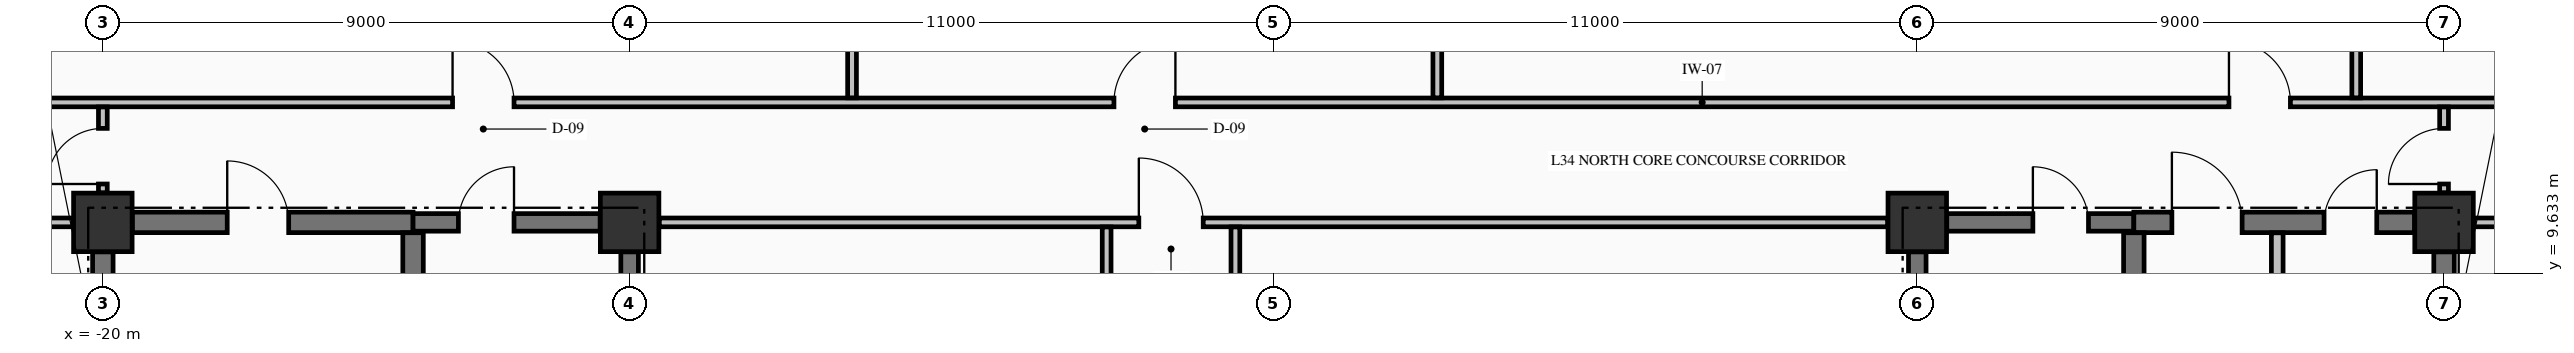
"""IFC4 building model, lengths in metres.
Left out: names, types, materials, properties, quantities, classifications, styles, units other than length and angle.
Written with IfcOpenShell. Run it as: python <this file> out.ifc"""

import sys

from ifc_helpers import new_model, si_unit, direction, frame, frame_2d, origin, origin_2d, place, context, subcontext, project, spatial, rectangle, extrude, element, fill, save


model = new_model("IFC4")
c1 = context("Model", 3, precision=1e-05, world=origin(), true_north=direction((0.0, 1.0)))
c2 = subcontext(c1, "Body", "Model", "MODEL_VIEW")
j1 = project(units=[si_unit("LENGTHUNIT", "METRE"), si_unit("PLANEANGLEUNIT", "RADIAN")], contexts=[c1])
p1 = place(None, origin())
s1 = spatial("IfcSite", under=j1, at=p1, CompositionType="ELEMENT")
p2 = place(p1, origin())
s2 = spatial("IfcBuilding", under=s1, at=p2, CompositionType="ELEMENT")
p3 = place(p2, frame((0.0, 0.0, 135.63)))
s3 = spatial("IfcBuildingStorey", under=s2, at=p3, CompositionType="ELEMENT", Elevation=135.63)
for number, where, z_axis, x_axis in (
    (1, (-20.0, 10.5, -0.25), (0.0, 0.0, 1.0), (1.0, 0.0, 0.0)),
    (2, (-11.0, 10.5, -0.25), (0.0, 0.0, 1.0), (1.0, 0.0, 0.0)),
    (3, (11.0, 10.5, -0.25), (0.0, 0.0, 1.0), (1.0, 0.0, 0.0)),
    (4, (20.0, 10.5, -0.25), (0.0, 0.0, 1.0), (1.0, 0.0, 0.0)),
):
    element("IfcColumn", number, at=place(p3, frame(where, z_axis=z_axis, x_axis=x_axis)), inside=s3, PredefinedType="COLUMN", context=c2, shape_type="SweptSolid", body=[
        extrude(rectangle(XDim=1.0, YDim=1.0, at=origin_2d()), origin(), (0.0, 0.0, 1.0), 3.57),
    ])
p4 = place(p3, frame((-19.496, 10.5, 0.0), z_axis=(0.0, 0.0, 1.0), x_axis=(1.0, 0.0, 0.0)))
e5 = element("IfcWall", 5, at=p4, inside=s3, PredefinedType="SHEAR", context=c2, shape_type="SweptSolid", body=[
    extrude(rectangle(XDim=4.796, YDim=0.35, at=frame_2d((2.398, 0.0))), origin(), (0.0, 0.0, 1.0), 3.32),
])
p5 = place(p4, frame((1.621, 0.0, 0.0)))
e6 = element("IfcOpeningElement", 6, at=p5, cuts=e5, PredefinedType="OPENING", context=c2, shape_type="SweptSolid", body=[
    extrude(rectangle(XDim=1.05, YDim=2.15, at=frame_2d((0.525, 1.075))), frame((0.0, 0.185, 0.0), z_axis=(0.0, -1.0, 0.0), x_axis=(1.0, 0.0, 0.0)), (0.0, 0.0, 1.0), 0.37),
])
p6 = place(p3, frame((-14.7, 10.5, 0.0), z_axis=(0.0, 0.0, 1.0), x_axis=(1.0, 0.0, 0.0)))
e7 = element("IfcWall", 7, at=p6, inside=s3, PredefinedType="SHEAR", context=c2, shape_type="SweptSolid", body=[
    extrude(rectangle(XDim=3.196, YDim=0.3, at=frame_2d((1.598, 0.0))), origin(), (0.0, 0.0, 1.0), 3.32),
])
p7 = place(p6, frame((0.775, 0.0, 0.0)))
e8 = element("IfcOpeningElement", 8, at=p7, cuts=e7, PredefinedType="OPENING", context=c2, shape_type="SweptSolid", body=[
    extrude(rectangle(XDim=0.95, YDim=2.15, at=frame_2d((0.475, 1.075))), frame((0.0, 0.16, 0.0), z_axis=(0.0, -1.0, 0.0), x_axis=(1.0, 0.0, 0.0)), (0.0, 0.0, 1.0), 0.32),
])
p8 = place(p3, frame((11.504, 10.5, 0.0), z_axis=(0.0, 0.0, 1.0), x_axis=(1.0, 0.0, 0.0)))
e9 = element("IfcWall", 9, at=p8, inside=s3, PredefinedType="SHEAR", context=c2, shape_type="SweptSolid", body=[
    extrude(rectangle(XDim=3.196, YDim=0.3, at=frame_2d((1.598, 0.0))), origin(), (0.0, 0.0, 1.0), 3.32),
])
p9 = place(p8, frame((1.471, 0.0, 0.0)))
e10 = element("IfcOpeningElement", 10, at=p9, cuts=e9, PredefinedType="OPENING", context=c2, shape_type="SweptSolid", body=[
    extrude(rectangle(XDim=0.95, YDim=2.15, at=frame_2d((0.475, 1.075))), frame((0.0, 0.16, 0.0), z_axis=(0.0, -1.0, 0.0), x_axis=(1.0, 0.0, 0.0)), (0.0, 0.0, 1.0), 0.32),
])
p10 = place(p3, frame((14.7, 10.5, 0.0), z_axis=(0.0, 0.0, 1.0), x_axis=(1.0, 0.0, 0.0)))
e11 = element("IfcWall", 11, at=p10, inside=s3, PredefinedType="SHEAR", context=c2, shape_type="SweptSolid", body=[
    extrude(rectangle(XDim=4.796, YDim=0.35, at=frame_2d((2.398, 0.0))), origin(), (0.0, 0.0, 1.0), 3.32),
])
p11 = place(p10, frame((0.65, 0.0, 0.0)))
e12 = element("IfcOpeningElement", 12, at=p11, cuts=e11, PredefinedType="OPENING", context=c2, shape_type="SweptSolid", body=[
    extrude(rectangle(XDim=1.2, YDim=2.15, at=frame_2d((0.6, 1.075))), frame((0.0, 0.185, 0.0), z_axis=(0.0, -1.0, 0.0), x_axis=(1.0, 0.0, 0.0)), (0.0, 0.0, 1.0), 0.37),
])
p12 = place(p10, frame((3.25, 0.0, 0.0)))
e13 = element("IfcOpeningElement", 13, at=p12, cuts=e11, PredefinedType="OPENING", context=c2, shape_type="SweptSolid", body=[
    extrude(rectangle(XDim=0.9, YDim=2.15, at=frame_2d((0.45, 1.075))), frame((0.0, 0.185, 0.0), z_axis=(0.0, -1.0, 0.0), x_axis=(1.0, 0.0, 0.0)), (0.0, 0.0, 1.0), 0.37),
])
p13 = place(p3, frame((-27.835, 10.5, 0.0), z_axis=(0.0, 0.0, 1.0), x_axis=(1.0, 0.0, 0.0)))
e14 = element("IfcWall", 14, at=p13, inside=s3, PredefinedType="PARTITIONING", context=c2, shape_type="SweptSolid", body=[
    extrude(rectangle(XDim=7.329, YDim=0.15, at=frame_2d((3.665, 0.0))), origin(), (0.0, 0.0, 1.0), 3.32),
])
p14 = place(p13, frame((3.36, 0.0, 0.0)))
e15 = element("IfcOpeningElement", 15, at=p14, cuts=e14, PredefinedType="OPENING", context=c2, shape_type="SweptSolid", body=[
    extrude(rectangle(XDim=0.95, YDim=2.15, at=frame_2d((0.475, 1.075))), frame((0.0, 0.085, 0.0), z_axis=(0.0, -1.0, 0.0), x_axis=(1.0, 0.0, 0.0)), (0.0, 0.0, 1.0), 0.17),
])
p15 = place(p3, frame((-10.494, 10.5, 0.0), z_axis=(0.0, 0.0, 1.0), x_axis=(1.0, 0.0, 0.0)))
e16 = element("IfcWall", 16, at=p15, inside=s3, PredefinedType="PARTITIONING", context=c2, shape_type="SweptSolid", body=[
    extrude(rectangle(XDim=20.988, YDim=0.15, at=frame_2d((10.494, 0.0))), origin(), (0.0, 0.0, 1.0), 3.32),
])
p16 = place(p15, frame((8.194, 0.0, 0.0)))
e17 = element("IfcOpeningElement", 17, at=p16, cuts=e16, PredefinedType="OPENING", context=c2, shape_type="SweptSolid", body=[
    extrude(rectangle(XDim=1.1, YDim=2.15, at=frame_2d((0.55, 1.075))), frame((0.0, 0.085, 0.0), z_axis=(0.0, -1.0, 0.0), x_axis=(1.0, 0.0, 0.0)), (0.0, 0.0, 1.0), 0.17),
])
p17 = place(p3, frame((20.506, 10.5, 0.0), z_axis=(0.0, 0.0, 1.0), x_axis=(1.0, 0.0, 0.0)))
e18 = element("IfcWall", 18, at=p17, inside=s3, PredefinedType="PARTITIONING", context=c2, shape_type="SweptSolid", body=[
    extrude(rectangle(XDim=2.329, YDim=0.15, at=frame_2d((1.165, 0.0))), origin(), (0.0, 0.0, 1.0), 3.32),
])
p18 = place(p17, frame((0.494, 0.0, 0.0)))
e19 = element("IfcOpeningElement", 19, at=p18, cuts=e18, PredefinedType="OPENING", context=c2, shape_type="SweptSolid", body=[
    extrude(rectangle(XDim=1.0, YDim=2.15, at=frame_2d((0.5, 1.075))), frame((0.0, 0.085, 0.0), z_axis=(0.0, -1.0, 0.0), x_axis=(1.0, 0.0, 0.0)), (0.0, 0.0, 1.0), 0.17),
])
p19 = place(p3, frame((-27.835, 12.55, 0.0), z_axis=(0.0, 0.0, 1.0), x_axis=(1.0, 0.0, 0.0)))
e20 = element("IfcWall", 20, at=p19, inside=s3, PredefinedType="PARTITIONING", context=c2, shape_type="SweptSolid", body=[
    extrude(rectangle(XDim=50.67, YDim=0.15, at=frame_2d((25.335, 0.0))), origin(), (0.0, 0.0, 1.0), 3.32),
])
p20 = place(p19, frame((13.81, 0.0, 0.0)))
e21 = element("IfcOpeningElement", 21, at=p20, cuts=e20, PredefinedType="OPENING", context=c2, shape_type="SweptSolid", body=[
    extrude(rectangle(XDim=1.05, YDim=2.15, at=frame_2d((0.525, 1.075))), frame((0.0, 0.085, 0.0), z_axis=(0.0, -1.0, 0.0), x_axis=(1.0, 0.0, 0.0)), (0.0, 0.0, 1.0), 0.17),
])
p21 = place(p19, frame((25.11, 0.0, 0.0)))
e22 = element("IfcOpeningElement", 22, at=p21, cuts=e20, PredefinedType="OPENING", context=c2, shape_type="SweptSolid", body=[
    extrude(rectangle(XDim=1.05, YDim=2.15, at=frame_2d((0.525, 1.075))), frame((0.0, 0.085, 0.0), z_axis=(0.0, -1.0, 0.0), x_axis=(1.0, 0.0, 0.0)), (0.0, 0.0, 1.0), 0.17),
])
p22 = place(p19, frame((44.16, 0.0, 0.0)))
e23 = element("IfcOpeningElement", 23, at=p22, cuts=e20, PredefinedType="OPENING", context=c2, shape_type="SweptSolid", body=[
    extrude(rectangle(XDim=1.05, YDim=2.15, at=frame_2d((0.525, 1.075))), frame((0.0, 0.085, 0.0), z_axis=(0.0, -1.0, 0.0), x_axis=(1.0, 0.0, 0.0)), (0.0, 0.0, 1.0), 0.17),
])
p23 = place(p3, frame((-20.0, 0.504, 0.0), z_axis=(0.0, 0.0, 1.0), x_axis=(0.0, 1.0, 0.0)))
e24 = element("IfcWall", 24, at=p23, inside=s3, PredefinedType="SHEAR", context=c2, shape_type="SweptSolid", body=[
    extrude(rectangle(XDim=9.492, YDim=0.35, at=frame_2d((4.746, 0.0))), origin(), (0.0, 0.0, 1.0), 3.32),
])
p24 = place(p3, frame((-14.7, 5.852, 0.0), z_axis=(0.0, 0.0, 1.0), x_axis=(0.0, 1.0, 0.0)))
e25 = element("IfcWall", 25, at=p24, inside=s3, PredefinedType="SHEAR", context=c2, shape_type="SweptSolid", body=[
    extrude(rectangle(XDim=4.471, YDim=0.35, at=frame_2d((2.235, 0.0))), origin(), (0.0, 0.0, 1.0), 3.32),
])
for number, where, z_axis, x_axis in (
    (26, (-11.0, 5.852, 0.0), (0.0, 0.0, 1.0), (0.0, 1.0, 0.0)),
    (27, (11.0, 5.852, 0.0), (0.0, 0.0, 1.0), (0.0, 1.0, 0.0)),
):
    element("IfcWall", number, at=place(p3, frame(where, z_axis=z_axis, x_axis=x_axis)), inside=s3, PredefinedType="SHEAR", context=c2, shape_type="SweptSolid", body=[
        extrude(rectangle(XDim=4.144, YDim=0.3, at=frame_2d((2.072, 0.0))), origin(), (0.0, 0.0, 1.0), 3.32),
    ])
p25 = place(p3, frame((14.7, 5.852, 0.0), z_axis=(0.0, 0.0, 1.0), x_axis=(0.0, 1.0, 0.0)))
e28 = element("IfcWall", 28, at=p25, inside=s3, PredefinedType="SHEAR", context=c2, shape_type="SweptSolid", body=[
    extrude(rectangle(XDim=4.471, YDim=0.35, at=frame_2d((2.235, 0.0))), origin(), (0.0, 0.0, 1.0), 3.32),
])
p26 = place(p3, frame((20.0, 5.377, 0.0), z_axis=(0.0, 0.0, 1.0), x_axis=(0.0, 1.0, 0.0)))
e29 = element("IfcWall", 29, at=p26, inside=s3, PredefinedType="SHEAR", context=c2, shape_type="SweptSolid", body=[
    extrude(rectangle(XDim=4.619, YDim=0.35, at=frame_2d((2.31, 0.0))), origin(), (0.0, 0.0, 1.0), 3.32),
])
p27 = place(p3, frame((-20.0, 11.006, 0.0), z_axis=(0.0, 0.0, 1.0), x_axis=(0.0, 1.0, 0.0)))
e30 = element("IfcWall", 30, at=p27, inside=s3, PredefinedType="PARTITIONING", context=c2, shape_type="SweptSolid", body=[
    extrude(rectangle(XDim=1.466, YDim=0.15, at=frame_2d((0.733, 0.0))), origin(), (0.0, 0.0, 1.0), 2.81),
])
p28 = place(p27, frame((0.15, 0.0, 0.0)))
e31 = element("IfcOpeningElement", 31, at=p28, cuts=e30, PredefinedType="OPENING", context=c2, shape_type="SweptSolid", body=[
    extrude(rectangle(XDim=0.95, YDim=2.15, at=frame_2d((0.475, 1.075))), frame((0.0, 0.085, 0.0), z_axis=(0.0, -1.0, 0.0), x_axis=(1.0, 0.0, 0.0)), (0.0, 0.0, 1.0), 0.17),
])
p29 = place(p3, frame((-7.2, 12.628, 0.0), z_axis=(0.0, 0.0, 1.0), x_axis=(0.0, 1.0, 0.0)))
e32 = element("IfcWall", 32, at=p29, inside=s3, PredefinedType="PARTITIONING", context=c2, shape_type="SweptSolid", body=[
    extrude(rectangle(XDim=12.707, YDim=0.15, at=frame_2d((6.354, 0.0))), origin(), (0.0, 0.0, 1.0), 3.32),
])
for number, where, z_axis, x_axis in (
    (33, (-2.85, 2.978, 0.0), (0.0, 0.0, 1.0), (0.0, 1.0, 0.0)),
    (34, (-0.65, 2.978, 0.0), (0.0, 0.0, 1.0), (0.0, 1.0, 0.0)),
):
    element("IfcWall", number, at=place(p3, frame(where, z_axis=z_axis, x_axis=x_axis)), inside=s3, PredefinedType="PARTITIONING", context=c2, shape_type="SweptSolid", body=[
        extrude(rectangle(XDim=7.444, YDim=0.15, at=frame_2d((3.722, 0.0))), origin(), (0.0, 0.0, 1.0), 3.32),
    ])
p30 = place(p3, frame((2.8, 12.628, 0.0), z_axis=(0.0, 0.0, 1.0), x_axis=(0.0, 1.0, 0.0)))
e35 = element("IfcWall", 35, at=p30, inside=s3, PredefinedType="PARTITIONING", context=c2, shape_type="SweptSolid", body=[
    extrude(rectangle(XDim=12.707, YDim=0.15, at=frame_2d((6.354, 0.0))), origin(), (0.0, 0.0, 1.0), 3.32),
])
p31 = place(p3, frame((17.15, 5.378, 0.0), z_axis=(0.0, 0.0, 1.0), x_axis=(0.0, 1.0, 0.0)))
e36 = element("IfcWall", 36, at=p31, inside=s3, PredefinedType="PARTITIONING", context=c2, shape_type="SweptSolid", body=[
    extrude(rectangle(XDim=4.944, YDim=0.2, at=frame_2d((2.472, 0.0))), origin(), (0.0, 0.0, 1.0), 3.32),
])
p32 = place(p3, frame((18.5, 12.628, 0.0), z_axis=(0.0, 0.0, 1.0), x_axis=(0.0, 1.0, 0.0)))
e37 = element("IfcWall", 37, at=p32, inside=s3, PredefinedType="PARTITIONING", context=c2, shape_type="SweptSolid", body=[
    extrude(rectangle(XDim=7.766, YDim=0.15, at=frame_2d((3.883, 0.0))), origin(), (0.0, 0.0, 1.0), 3.32),
])
p33 = place(p3, frame((20.0, 11.006, 0.0), z_axis=(0.0, 0.0, 1.0), x_axis=(0.0, 1.0, 0.0)))
e38 = element("IfcWall", 38, at=p33, inside=s3, PredefinedType="PARTITIONING", context=c2, shape_type="SweptSolid", body=[
    extrude(rectangle(XDim=1.466, YDim=0.15, at=frame_2d((0.733, 0.0))), origin(), (0.0, 0.0, 1.0), 2.81),
])
p34 = place(p33, frame((0.15, 0.0, 0.0)))
e39 = element("IfcOpeningElement", 39, at=p34, cuts=e38, PredefinedType="OPENING", context=c2, shape_type="SweptSolid", body=[
    extrude(rectangle(XDim=0.95, YDim=2.15, at=frame_2d((0.475, 1.075))), frame((0.0, 0.085, 0.0), z_axis=(0.0, -1.0, 0.0), x_axis=(1.0, 0.0, 0.0)), (0.0, 0.0, 1.0), 0.17),
])
p35 = place(p7, origin())
e40 = element("IfcDoor", 40, at=p35, inside=s3, OperationType="SINGLE_SWING_RIGHT", PredefinedType="DOOR", context=c2, shape_type="SweptSolid", body=[
    extrude(rectangle(XDim=0.95, YDim=2.15, at=frame_2d((0.475, 1.075))), frame((0.0, 0.025, 0.0), z_axis=(0.0, -1.0, 0.0), x_axis=(1.0, 0.0, 0.0)), (0.0, 0.0, 1.0), 0.05),
])
fill(e8, e40)
p36 = place(p9, origin())
e41 = element("IfcDoor", 41, at=p36, inside=s3, OperationType="SINGLE_SWING_LEFT", PredefinedType="DOOR", context=c2, shape_type="SweptSolid", body=[
    extrude(rectangle(XDim=0.95, YDim=2.15, at=frame_2d((0.475, 1.075))), frame((0.0, 0.025, 0.0), z_axis=(0.0, -1.0, 0.0), x_axis=(1.0, 0.0, 0.0)), (0.0, 0.0, 1.0), 0.05),
])
fill(e10, e41)
p37 = place(p5, origin())
e42 = element("IfcDoor", 42, at=p37, inside=s3, OperationType="SINGLE_SWING_LEFT", PredefinedType="DOOR", context=c2, shape_type="SweptSolid", body=[
    extrude(rectangle(XDim=1.05, YDim=2.15, at=frame_2d((0.525, 1.075))), frame((0.0, 0.025, 0.0), z_axis=(0.0, -1.0, 0.0), x_axis=(1.0, 0.0, 0.0)), (0.0, 0.0, 1.0), 0.05),
])
fill(e6, e42)
p38 = place(p11, origin())
e43 = element("IfcDoor", 43, at=p38, inside=s3, OperationType="SINGLE_SWING_LEFT", PredefinedType="DOOR", context=c2, shape_type="SweptSolid", body=[
    extrude(rectangle(XDim=1.2, YDim=2.15, at=frame_2d((0.6, 1.075))), frame((0.0, 0.025, 0.0), z_axis=(0.0, -1.0, 0.0), x_axis=(1.0, 0.0, 0.0)), (0.0, 0.0, 1.0), 0.05),
])
fill(e12, e43)
p39 = place(p12, origin())
e44 = element("IfcDoor", 44, at=p39, inside=s3, OperationType="SINGLE_SWING_RIGHT", PredefinedType="DOOR", context=c2, shape_type="SweptSolid", body=[
    extrude(rectangle(XDim=0.9, YDim=2.15, at=frame_2d((0.45, 1.075))), frame((0.0, 0.025, 0.0), z_axis=(0.0, -1.0, 0.0), x_axis=(1.0, 0.0, 0.0)), (0.0, 0.0, 1.0), 0.05),
])
fill(e13, e44)
p40 = place(p16, origin())
e45 = element("IfcDoor", 45, at=p40, inside=s3, OperationType="SINGLE_SWING_LEFT", PredefinedType="DOOR", context=c2, shape_type="SweptSolid", body=[
    extrude(rectangle(XDim=1.1, YDim=2.15, at=frame_2d((0.55, 1.075))), frame((0.0, 0.025, 0.0), z_axis=(0.0, -1.0, 0.0), x_axis=(1.0, 0.0, 0.0)), (0.0, 0.0, 1.0), 0.05),
])
fill(e17, e45)
p41 = place(p20, origin())
e46 = element("IfcDoor", 46, at=p41, inside=s3, OperationType="SINGLE_SWING_LEFT", PredefinedType="DOOR", context=c2, shape_type="SweptSolid", body=[
    extrude(rectangle(XDim=1.05, YDim=2.15, at=frame_2d((0.525, 1.075))), frame((0.0, 0.025, 0.0), z_axis=(0.0, -1.0, 0.0), x_axis=(1.0, 0.0, 0.0)), (0.0, 0.0, 1.0), 0.05),
])
fill(e21, e46)
p42 = place(p21, origin())
e47 = element("IfcDoor", 47, at=p42, inside=s3, OperationType="SINGLE_SWING_RIGHT", PredefinedType="DOOR", context=c2, shape_type="SweptSolid", body=[
    extrude(rectangle(XDim=1.05, YDim=2.15, at=frame_2d((0.525, 1.075))), frame((0.0, 0.025, 0.0), z_axis=(0.0, -1.0, 0.0), x_axis=(1.0, 0.0, 0.0)), (0.0, 0.0, 1.0), 0.05),
])
fill(e22, e47)
p43 = place(p22, origin())
e48 = element("IfcDoor", 48, at=p43, inside=s3, OperationType="SINGLE_SWING_LEFT", PredefinedType="DOOR", context=c2, shape_type="SweptSolid", body=[
    extrude(rectangle(XDim=1.05, YDim=2.15, at=frame_2d((0.525, 1.075))), frame((0.0, 0.025, 0.0), z_axis=(0.0, -1.0, 0.0), x_axis=(1.0, 0.0, 0.0)), (0.0, 0.0, 1.0), 0.05),
])
fill(e23, e48)
p44 = place(p28, origin())
e49 = element("IfcDoor", 49, at=p44, inside=s3, OperationType="SINGLE_SWING_LEFT", PredefinedType="DOOR", context=c2, shape_type="SweptSolid", body=[
    extrude(rectangle(XDim=0.95, YDim=2.15, at=frame_2d((0.475, 1.075))), frame((0.0, 0.025, 0.0), z_axis=(0.0, -1.0, 0.0), x_axis=(1.0, 0.0, 0.0)), (0.0, 0.0, 1.0), 0.05),
])
fill(e31, e49)
p45 = place(p34, origin())
e50 = element("IfcDoor", 50, at=p45, inside=s3, OperationType="SINGLE_SWING_LEFT", PredefinedType="DOOR", context=c2, shape_type="SweptSolid", body=[
    extrude(rectangle(XDim=0.95, YDim=2.15, at=frame_2d((0.475, 1.075))), frame((0.0, 0.025, 0.0), z_axis=(0.0, -1.0, 0.0), x_axis=(1.0, 0.0, 0.0)), (0.0, 0.0, 1.0), 0.05),
])
fill(e39, e50)
save(model, sys.argv[1])
